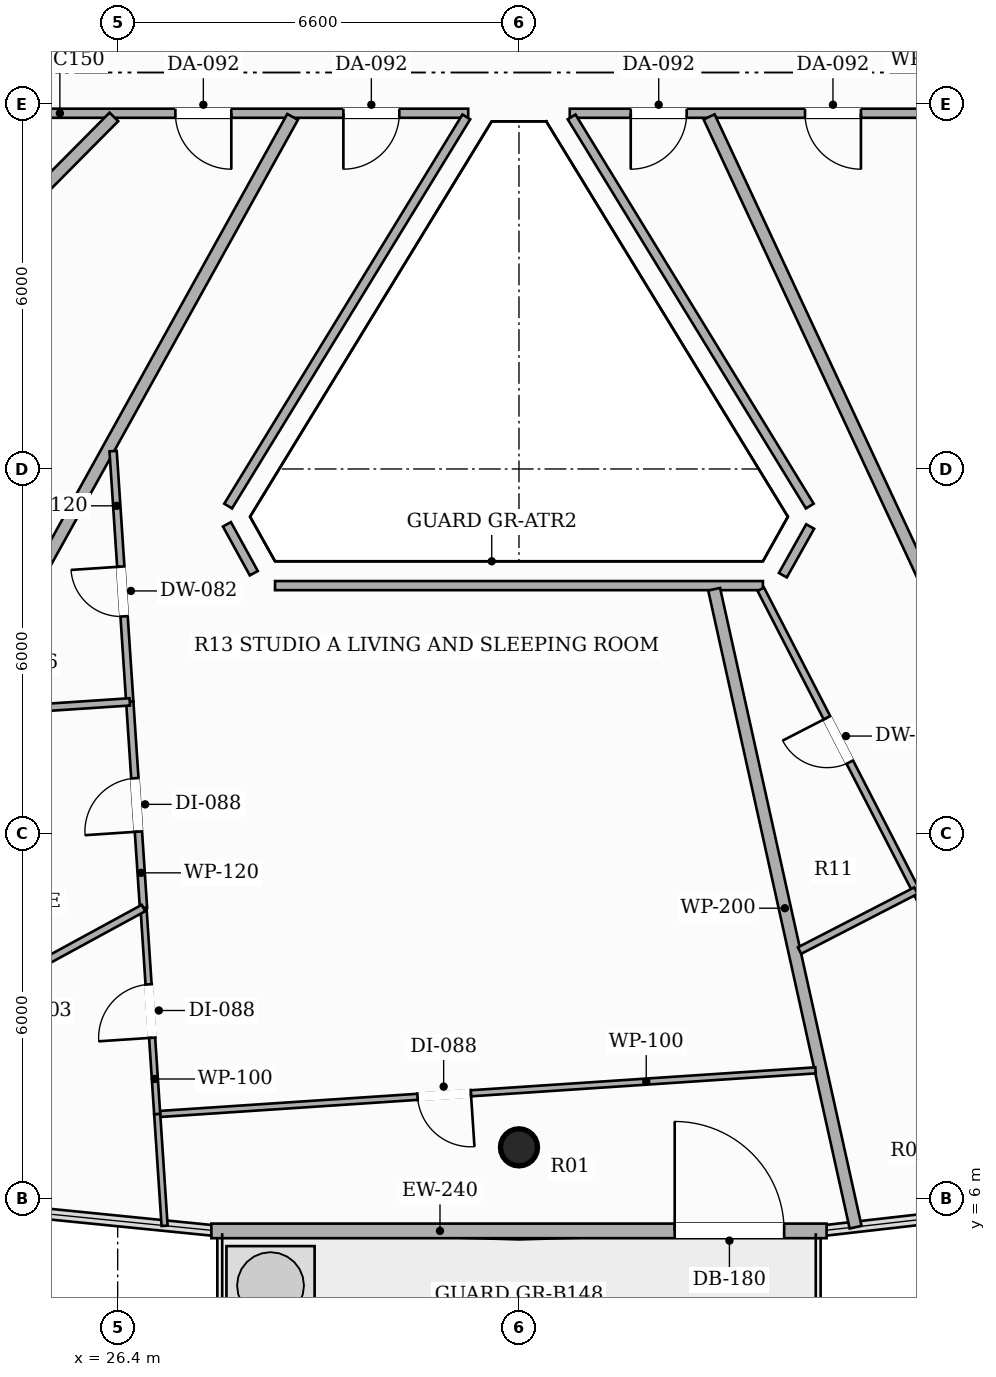
"""IFC4 building model, lengths in metres.
Left out: names, types, materials, properties, quantities, classifications, styles, units other than length and angle.
Written with IfcOpenShell. Run it as: python <this file> out.ifc"""

import sys

from ifc_helpers import new_model, si_unit, direction, frame, frame_2d, origin, origin_2d, place, context, subcontext, project, spatial, rectangle, hollow_circle, extrude, element, fill, save


model = new_model("IFC4")
c1 = context("Model", 3, precision=1e-05, world=origin(), true_north=direction((0.0, 1.0)))
c2 = subcontext(c1, "Body", "Model", "MODEL_VIEW")
j1 = project(units=[si_unit("LENGTHUNIT", "METRE"), si_unit("PLANEANGLEUNIT", "RADIAN")], contexts=[c1])
p1 = place(None, origin())
s1 = spatial("IfcSite", under=j1, at=p1, CompositionType="ELEMENT")
p2 = place(p1, origin())
s2 = spatial("IfcBuilding", under=s1, at=p2, CompositionType="ELEMENT")
p3 = place(p2, frame((0.0, 0.0, 253.55)))
s3 = spatial("IfcBuildingStorey", under=s2, at=p3, CompositionType="ELEMENT", Elevation=253.55)
p4 = place(p3, frame((33.0, 6.844, 0.0), z_axis=(0.0, 0.0, 1.0), x_axis=(1.0, 0.0, 0.0)))
e1 = element("IfcColumn", 1, at=p4, inside=s3, PredefinedType="COLUMN", context=c2, shape_type="SweptSolid", body=[
    extrude(hollow_circle(Radius=0.305, WallThickness=0.016, at=origin_2d()), origin(), (0.0, 0.0, 1.0), 3.3),
])
p5 = place(p3, frame((27.941, 5.47, 0.0), z_axis=(0.0, 0.0, 1.0), x_axis=(1.0, 0.0, 0.0)))
e2 = element("IfcWall", 2, at=p5, inside=s3, PredefinedType="SOLIDWALL", context=c2, shape_type="SweptSolid", body=[
    extrude(rectangle(XDim=10.118, YDim=0.24, at=frame_2d((5.059, 0.0))), origin(), (0.0, 0.0, 1.0), 2.464),
])
p6 = place(p5, frame((7.62, 0.0, 0.0)))
e3 = element("IfcOpeningElement", 3, at=p6, cuts=e2, PredefinedType="OPENING", context=c2, shape_type="SweptSolid", body=[
    extrude(rectangle(XDim=1.8, YDim=2.2, at=frame_2d((0.9, 1.1))), frame((0.0, 0.13, 0.0), z_axis=(0.0, -1.0, 0.0), x_axis=(1.0, 0.0, 0.0)), (0.0, 0.0, 1.0), 0.26),
])
p7 = place(p3, frame((32.165, 23.85, 0.0), z_axis=(0.0, 0.0, 1.0), x_axis=(-1.0, 0.0, 0.0)))
e4 = element("IfcWall", 4, at=p7, inside=s3, PredefinedType="PARTITIONING", context=c2, shape_type="SweptSolid", body=[
    extrude(rectangle(XDim=8.515, YDim=0.15, at=frame_2d((4.258, 0.0))), origin(), (0.0, 0.0, 1.0), 2.405),
])
p8 = place(p7, frame((1.133, 0.0, 0.0)))
e5 = element("IfcOpeningElement", 5, at=p8, cuts=e4, PredefinedType="OPENING", context=c2, shape_type="SweptSolid", body=[
    extrude(rectangle(XDim=0.92, YDim=2.15, at=frame_2d((0.46, 1.075))), frame((0.0, 0.085, 0.0), z_axis=(0.0, -1.0, 0.0), x_axis=(1.0, 0.0, 0.0)), (0.0, 0.0, 1.0), 0.17),
])
p9 = place(p7, frame((3.896, 0.0, 0.0)))
e6 = element("IfcOpeningElement", 6, at=p9, cuts=e4, PredefinedType="OPENING", context=c2, shape_type="SweptSolid", body=[
    extrude(rectangle(XDim=0.92, YDim=2.15, at=frame_2d((0.46, 1.075))), frame((0.0, 0.085, 0.0), z_axis=(0.0, -1.0, 0.0), x_axis=(1.0, 0.0, 0.0)), (0.0, 0.0, 1.0), 0.17),
])
p10 = place(p3, frame((42.19, 23.85, 0.0), z_axis=(0.0, 0.0, 1.0), x_axis=(-1.0, 0.0, 0.0)))
e7 = element("IfcWall", 7, at=p10, inside=s3, PredefinedType="PARTITIONING", context=c2, shape_type="SweptSolid", body=[
    extrude(rectangle(XDim=8.355, YDim=0.15, at=frame_2d((4.177, 0.0))), origin(), (0.0, 0.0, 1.0), 2.405),
])
p11 = place(p10, frame((0.2, 0.0, 0.0)))
e8 = element("IfcOpeningElement", 8, at=p11, cuts=e7, PredefinedType="OPENING", context=c2, shape_type="SweptSolid", body=[
    extrude(rectangle(XDim=0.92, YDim=2.15, at=frame_2d((0.46, 1.075))), frame((0.0, 0.085, 0.0), z_axis=(0.0, -1.0, 0.0), x_axis=(1.0, 0.0, 0.0)), (0.0, 0.0, 1.0), 0.17),
])
p12 = place(p10, frame((3.566, 0.0, 0.0)))
e9 = element("IfcOpeningElement", 9, at=p12, cuts=e7, PredefinedType="OPENING", context=c2, shape_type="SweptSolid", body=[
    extrude(rectangle(XDim=0.92, YDim=2.15, at=frame_2d((0.46, 1.075))), frame((0.0, 0.085, 0.0), z_axis=(0.0, -1.0, 0.0), x_axis=(1.0, 0.0, 0.0)), (0.0, 0.0, 1.0), 0.17),
])
p13 = place(p10, frame((6.432, 0.0, 0.0)))
e10 = element("IfcOpeningElement", 10, at=p13, cuts=e7, PredefinedType="OPENING", context=c2, shape_type="SweptSolid", body=[
    extrude(rectangle(XDim=0.92, YDim=2.15, at=frame_2d((0.46, 1.075))), frame((0.0, 0.085, 0.0), z_axis=(0.0, -1.0, 0.0), x_axis=(1.0, 0.0, 0.0)), (0.0, 0.0, 1.0), 0.17),
])
p14 = place(p3, frame((33.866, 23.79, 0.0), z_axis=(0.0, 0.0, 1.0), x_axis=(0.522011859837, -0.852938226479, 0.0)))
e11 = element("IfcWall", 11, at=p14, inside=s3, PredefinedType="PARTITIONING", context=c2, shape_type="SweptSolid", body=[
    extrude(rectangle(XDim=7.504, YDim=0.15, at=frame_2d((3.752, 0.0))), origin(), (0.0, 0.0, 1.0), 2.613),
])
p15 = place(p3, frame((37.789, 17.054, 0.0), z_axis=(0.0, 0.0, 1.0), x_axis=(-0.488935266506, -0.872320070368, 0.0)))
e12 = element("IfcWall", 12, at=p15, inside=s3, PredefinedType="PARTITIONING", context=c2, shape_type="SweptSolid", body=[
    extrude(rectangle(XDim=0.918, YDim=0.15, at=frame_2d((0.459, 0.0))), origin(), (0.0, 0.0, 1.0), 2.9),
])
p16 = place(p3, frame((37.012, 16.082, 0.0), z_axis=(0.0, 0.0, 1.0), x_axis=(-1.0, 0.0, 0.0)))
e13 = element("IfcWall", 13, at=p16, inside=s3, PredefinedType="PARTITIONING", context=c2, shape_type="SweptSolid", body=[
    extrude(rectangle(XDim=8.024, YDim=0.15, at=frame_2d((4.012, 0.0))), origin(), (0.0, 0.0, 1.0), 2.613),
])
p17 = place(p3, frame((28.639, 16.286, 0.0), z_axis=(0.0, 0.0, 1.0), x_axis=(-0.481571453054, 0.876406832244, 0.0)))
e14 = element("IfcWall", 14, at=p17, inside=s3, PredefinedType="PARTITIONING", context=c2, shape_type="SweptSolid", body=[
    extrude(rectangle(XDim=0.918, YDim=0.15, at=frame_2d((0.459, 0.0))), origin(), (0.0, 0.0, 1.0), 2.9),
])
p18 = place(p3, frame((28.217, 17.39, 0.0), z_axis=(0.0, 0.0, 1.0), x_axis=(0.522011859837, 0.852938226479, 0.0)))
e15 = element("IfcWall", 15, at=p18, inside=s3, PredefinedType="PARTITIONING", context=c2, shape_type="SweptSolid", body=[
    extrude(rectangle(XDim=7.504, YDim=0.15, at=frame_2d((3.752, 0.0))), origin(), (0.0, 0.0, 1.0), 2.613),
])
p19 = place(p3, frame((19.575, 6.302, 0.0), z_axis=(0.0, 0.0, 1.0), x_axis=(0.485129783088, 0.874442161358, 0.0)))
e16 = element("IfcWall", 16, at=p19, inside=s3, PredefinedType="PARTITIONING", context=c2, shape_type="SweptSolid", body=[
    extrude(rectangle(XDim=19.999, YDim=0.2, at=frame_2d((10.0, 0.0))), origin(), (0.0, 0.0, 1.0), 2.332),
])
p20 = place(p3, frame((36.21, 16.022, 0.0), z_axis=(0.0, 0.0, 1.0), x_axis=(0.216451711791, -0.976293325012, 0.0)))
e17 = element("IfcWall", 17, at=p20, inside=s3, PredefinedType="PARTITIONING", context=c2, shape_type="SweptSolid", body=[
    extrude(rectangle(XDim=10.746, YDim=0.2, at=frame_2d((5.373, 0.0))), origin(), (0.0, 0.0, 1.0), 2.332),
])
p21 = place(p3, frame((26.338, 23.79, 0.0), z_axis=(0.0, 0.0, 1.0), x_axis=(-0.70454576136, -0.70965855885, 0.0)))
e18 = element("IfcWall", 18, at=p21, inside=s3, PredefinedType="PARTITIONING", context=c2, shape_type="SweptSolid", body=[
    extrude(rectangle(XDim=21.536, YDim=0.2, at=frame_2d((10.768, 0.0))), origin(), (0.0, 0.0, 1.0), 2.332),
])
p22 = place(p3, frame((44.391, 6.058, 0.0), z_axis=(0.0, 0.0, 1.0), x_axis=(-0.422434507673, 0.906393450289, 0.0)))
e19 = element("IfcWall", 19, at=p22, inside=s3, PredefinedType="PARTITIONING", context=c2, shape_type="SweptSolid", body=[
    extrude(rectangle(XDim=19.563, YDim=0.2, at=frame_2d((9.782, 0.0))), origin(), (0.0, 0.0, 1.0), 2.332),
])
p23 = place(p3, frame((26.599, 14.17, 0.0), z_axis=(0.0, 0.0, 1.0), x_axis=(-0.066334744758, 0.997797425151, 0.0)))
e20 = element("IfcWall", 20, at=p23, inside=s3, PredefinedType="PARTITIONING", context=c2, shape_type="SweptSolid", body=[
    extrude(rectangle(XDim=4.133, YDim=0.12, at=frame_2d((2.066, 0.0))), origin(), (0.0, 0.0, 1.0), 2.613),
])
p24 = place(p23, frame((1.409, 0.0, 0.0)))
e21 = element("IfcOpeningElement", 21, at=p24, cuts=e20, PredefinedType="OPENING", context=c2, shape_type="SweptSolid", body=[
    extrude(rectangle(XDim=0.82, YDim=2.1, at=frame_2d((0.41, 1.05))), frame((0.0, 0.07, 0.0), z_axis=(0.0, -1.0, 0.0), x_axis=(1.0, 0.0, 0.0)), (0.0, 0.0, 1.0), 0.14),
])
p25 = place(p3, frame((26.825, 10.78, 0.0), z_axis=(0.0, 0.0, 1.0), x_axis=(-0.066471315173, 0.997788336402, 0.0)))
e22 = element("IfcWall", 22, at=p25, inside=s3, PredefinedType="PARTITIONING", context=c2, shape_type="SweptSolid", body=[
    extrude(rectangle(XDim=3.397, YDim=0.12, at=frame_2d((1.699, 0.0))), origin(), (0.0, 0.0, 1.0), 2.9),
])
p26 = place(p25, frame((1.259, 0.0, 0.0)))
e23 = element("IfcOpeningElement", 23, at=p26, cuts=e22, PredefinedType="OPENING", context=c2, shape_type="SweptSolid", body=[
    extrude(rectangle(XDim=0.88, YDim=2.1, at=frame_2d((0.44, 1.05))), frame((0.0, 0.07, 0.0), z_axis=(0.0, -1.0, 0.0), x_axis=(1.0, 0.0, 0.0)), (0.0, 0.0, 1.0), 0.14),
])
p27 = place(p3, frame((37.877, 8.11, 0.0), z_axis=(0.0, 0.0, 1.0), x_axis=(-0.997794804299, -0.066374155471, 0.0)))
e24 = element("IfcWall", 24, at=p27, inside=s3, PredefinedType="PARTITIONING", context=c2, shape_type="SweptSolid", body=[
    extrude(rectangle(XDim=10.851, YDim=0.1, at=frame_2d((5.425, 0.0))), origin(), (0.0, 0.0, 1.0), 2.332),
])
p28 = place(p27, frame((5.68, 0.0, 0.0)))
e25 = element("IfcOpeningElement", 25, at=p28, cuts=e24, PredefinedType="OPENING", context=c2, shape_type="SweptSolid", body=[
    extrude(rectangle(XDim=0.88, YDim=2.1, at=frame_2d((0.44, 1.05))), frame((0.0, 0.06, 0.0), z_axis=(0.0, -1.0, 0.0), x_axis=(1.0, 0.0, 0.0)), (0.0, 0.0, 1.0), 0.12),
])
p29 = place(p3, frame((27.05, 7.39, 0.0), z_axis=(0.0, 0.0, 1.0), x_axis=(-0.066251929929, 0.997802927326, 0.0)))
e26 = element("IfcWall", 26, at=p29, inside=s3, PredefinedType="PARTITIONING", context=c2, shape_type="SweptSolid", body=[
    extrude(rectangle(XDim=3.398, YDim=0.1, at=frame_2d((1.699, 0.0))), origin(), (0.0, 0.0, 1.0), 2.332),
])
p30 = place(p29, frame((1.259, 0.0, 0.0)))
e27 = element("IfcOpeningElement", 27, at=p30, cuts=e26, PredefinedType="OPENING", context=c2, shape_type="SweptSolid", body=[
    extrude(rectangle(XDim=0.88, YDim=2.1, at=frame_2d((0.44, 1.05))), frame((0.0, 0.06, 0.0), z_axis=(0.0, -1.0, 0.0), x_axis=(1.0, 0.0, 0.0)), (0.0, 0.0, 1.0), 0.12),
])
p31 = place(p3, frame((26.599, 14.17, 0.0), z_axis=(0.0, 0.0, 1.0), x_axis=(-0.99779365881, -0.066391373223, 0.0)))
e28 = element("IfcWall", 28, at=p31, inside=s3, PredefinedType="PARTITIONING", context=c2, shape_type="SweptSolid", body=[
    extrude(rectangle(XDim=2.666, YDim=0.12, at=frame_2d((1.333, 0.0))), origin(), (0.0, 0.0, 1.0), 2.613),
])
p32 = place(p3, frame((26.825, 10.78, 0.0), z_axis=(0.0, 0.0, 1.0), x_axis=(-0.87825059366, -0.478200684583, 0.0)))
e29 = element("IfcWall", 29, at=p32, inside=s3, PredefinedType="PARTITIONING", context=c2, shape_type="SweptSolid", body=[
    extrude(rectangle(XDim=7.616, YDim=0.12, at=frame_2d((3.808, 0.0))), origin(), (0.0, 0.0, 1.0), 2.332),
])
p33 = place(p3, frame((27.172, 5.554, 0.0), z_axis=(0.0, 0.0, 1.0), x_axis=(-0.066342877953, 0.997796884413, 0.0)))
e30 = element("IfcWall", 30, at=p33, inside=s3, PredefinedType="PARTITIONING", context=c2, shape_type="SweptSolid", body=[
    extrude(rectangle(XDim=1.84, YDim=0.1, at=frame_2d((0.92, 0.0))), origin(), (0.0, 0.0, 1.0), 2.332),
])
p34 = place(p3, frame((39.529, 11.066, 0.0), z_axis=(0.0, 0.0, 1.0), x_axis=(-0.457798211716, 0.889056127221, 0.0)))
e31 = element("IfcWall", 31, at=p34, inside=s3, PredefinedType="PARTITIONING", context=c2, shape_type="SweptSolid", body=[
    extrude(rectangle(XDim=5.574, YDim=0.12, at=frame_2d((2.787, 0.0))), origin(), (0.0, 0.0, 1.0), 2.613),
])
p35 = place(p34, frame((2.377, 0.0, 0.0)))
e32 = element("IfcOpeningElement", 32, at=p35, cuts=e31, PredefinedType="OPENING", context=c2, shape_type="SweptSolid", body=[
    extrude(rectangle(XDim=0.82, YDim=2.1, at=frame_2d((0.41, 1.05))), frame((0.0, 0.07, 0.0), z_axis=(0.0, -1.0, 0.0), x_axis=(1.0, 0.0, 0.0)), (0.0, 0.0, 1.0), 0.14),
])
p36 = place(p3, frame((42.228, 5.826, 0.0), z_axis=(0.0, 0.0, 1.0), x_axis=(-0.457901041138, 0.889003170143, 0.0)))
e33 = element("IfcWall", 33, at=p36, inside=s3, PredefinedType="PARTITIONING", context=c2, shape_type="SweptSolid", body=[
    extrude(rectangle(XDim=5.894, YDim=0.12, at=frame_2d((2.947, 0.0))), origin(), (0.0, 0.0, 1.0), 2.332),
])
p37 = place(p36, frame((2.507, 0.0, 0.0)))
e34 = element("IfcOpeningElement", 34, at=p37, cuts=e33, PredefinedType="OPENING", context=c2, shape_type="SweptSolid", body=[
    extrude(rectangle(XDim=0.88, YDim=2.1, at=frame_2d((0.44, 1.05))), frame((0.0, 0.07, 0.0), z_axis=(0.0, -1.0, 0.0), x_axis=(1.0, 0.0, 0.0)), (0.0, 0.0, 1.0), 0.14),
])
p38 = place(p3, frame((39.529, 11.066, 0.0), z_axis=(0.0, 0.0, 1.0), x_axis=(-0.889105964634, -0.457701413207, 0.0)))
e35 = element("IfcWall", 35, at=p38, inside=s3, PredefinedType="PARTITIONING", context=c2, shape_type="SweptSolid", body=[
    extrude(rectangle(XDim=2.154, YDim=0.12, at=frame_2d((1.077, 0.0))), origin(), (0.0, 0.0, 1.0), 2.613),
])
p39 = place(p6, origin())
e36 = element("IfcDoor", 36, at=p39, inside=s3, OperationType="SINGLE_SWING_LEFT", PredefinedType="DOOR", context=c2, shape_type="SweptSolid", body=[
    extrude(rectangle(XDim=1.8, YDim=2.2, at=frame_2d((0.9, 1.1))), frame((0.0, 0.025, 0.0), z_axis=(0.0, -1.0, 0.0), x_axis=(1.0, 0.0, 0.0)), (0.0, 0.0, 1.0), 0.05),
])
fill(e3, e36)
p40 = place(p8, origin())
e37 = element("IfcDoor", 37, at=p40, inside=s3, OperationType="SINGLE_SWING_RIGHT", PredefinedType="DOOR", context=c2, shape_type="SweptSolid", body=[
    extrude(rectangle(XDim=0.92, YDim=2.15, at=frame_2d((0.46, 1.075))), frame((0.0, 0.025, 0.0), z_axis=(0.0, -1.0, 0.0), x_axis=(1.0, 0.0, 0.0)), (0.0, 0.0, 1.0), 0.05),
])
fill(e5, e37)
p41 = place(p24, origin())
e38 = element("IfcDoor", 38, at=p41, inside=s3, OperationType="SINGLE_SWING_RIGHT", PredefinedType="DOOR", context=c2, shape_type="SweptSolid", body=[
    extrude(rectangle(XDim=0.82, YDim=2.1, at=frame_2d((0.41, 1.05))), frame((0.0, 0.025, 0.0), z_axis=(0.0, -1.0, 0.0), x_axis=(1.0, 0.0, 0.0)), (0.0, 0.0, 1.0), 0.05),
])
fill(e21, e38)
p42 = place(p26, origin())
e39 = element("IfcDoor", 39, at=p42, inside=s3, OperationType="SINGLE_SWING_LEFT", PredefinedType="DOOR", context=c2, shape_type="SweptSolid", body=[
    extrude(rectangle(XDim=0.88, YDim=2.1, at=frame_2d((0.44, 1.05))), frame((0.0, 0.025, 0.0), z_axis=(0.0, -1.0, 0.0), x_axis=(1.0, 0.0, 0.0)), (0.0, 0.0, 1.0), 0.05),
])
fill(e23, e39)
p43 = place(p28, origin())
e40 = element("IfcDoor", 40, at=p43, inside=s3, OperationType="SINGLE_SWING_LEFT", PredefinedType="DOOR", context=c2, shape_type="SweptSolid", body=[
    extrude(rectangle(XDim=0.88, YDim=2.1, at=frame_2d((0.44, 1.05))), frame((0.0, 0.025, 0.0), z_axis=(0.0, -1.0, 0.0), x_axis=(1.0, 0.0, 0.0)), (0.0, 0.0, 1.0), 0.05),
])
fill(e25, e40)
p44 = place(p30, origin())
e41 = element("IfcDoor", 41, at=p44, inside=s3, OperationType="SINGLE_SWING_LEFT", PredefinedType="DOOR", context=c2, shape_type="SweptSolid", body=[
    extrude(rectangle(XDim=0.88, YDim=2.1, at=frame_2d((0.44, 1.05))), frame((0.0, 0.025, 0.0), z_axis=(0.0, -1.0, 0.0), x_axis=(1.0, 0.0, 0.0)), (0.0, 0.0, 1.0), 0.05),
])
fill(e27, e41)
p45 = place(p9, origin())
e42 = element("IfcDoor", 42, at=p45, inside=s3, OperationType="SINGLE_SWING_LEFT", PredefinedType="DOOR", context=c2, shape_type="SweptSolid", body=[
    extrude(rectangle(XDim=0.92, YDim=2.15, at=frame_2d((0.46, 1.075))), frame((0.0, 0.025, 0.0), z_axis=(0.0, -1.0, 0.0), x_axis=(1.0, 0.0, 0.0)), (0.0, 0.0, 1.0), 0.05),
])
fill(e6, e42)
p46 = place(p12, origin())
e43 = element("IfcDoor", 43, at=p46, inside=s3, OperationType="SINGLE_SWING_LEFT", PredefinedType="DOOR", context=c2, shape_type="SweptSolid", body=[
    extrude(rectangle(XDim=0.92, YDim=2.15, at=frame_2d((0.46, 1.075))), frame((0.0, 0.025, 0.0), z_axis=(0.0, -1.0, 0.0), x_axis=(1.0, 0.0, 0.0)), (0.0, 0.0, 1.0), 0.05),
])
fill(e9, e43)
p47 = place(p13, origin())
e44 = element("IfcDoor", 44, at=p47, inside=s3, OperationType="SINGLE_SWING_RIGHT", PredefinedType="DOOR", context=c2, shape_type="SweptSolid", body=[
    extrude(rectangle(XDim=0.92, YDim=2.15, at=frame_2d((0.46, 1.075))), frame((0.0, 0.025, 0.0), z_axis=(0.0, -1.0, 0.0), x_axis=(1.0, 0.0, 0.0)), (0.0, 0.0, 1.0), 0.05),
])
fill(e10, e44)
p48 = place(p35, origin())
e45 = element("IfcDoor", 45, at=p48, inside=s3, OperationType="SINGLE_SWING_RIGHT", PredefinedType="DOOR", context=c2, shape_type="SweptSolid", body=[
    extrude(rectangle(XDim=0.82, YDim=2.1, at=frame_2d((0.41, 1.05))), frame((0.0, 0.025, 0.0), z_axis=(0.0, -1.0, 0.0), x_axis=(1.0, 0.0, 0.0)), (0.0, 0.0, 1.0), 0.05),
])
fill(e32, e45)
save(model, sys.argv[1])
